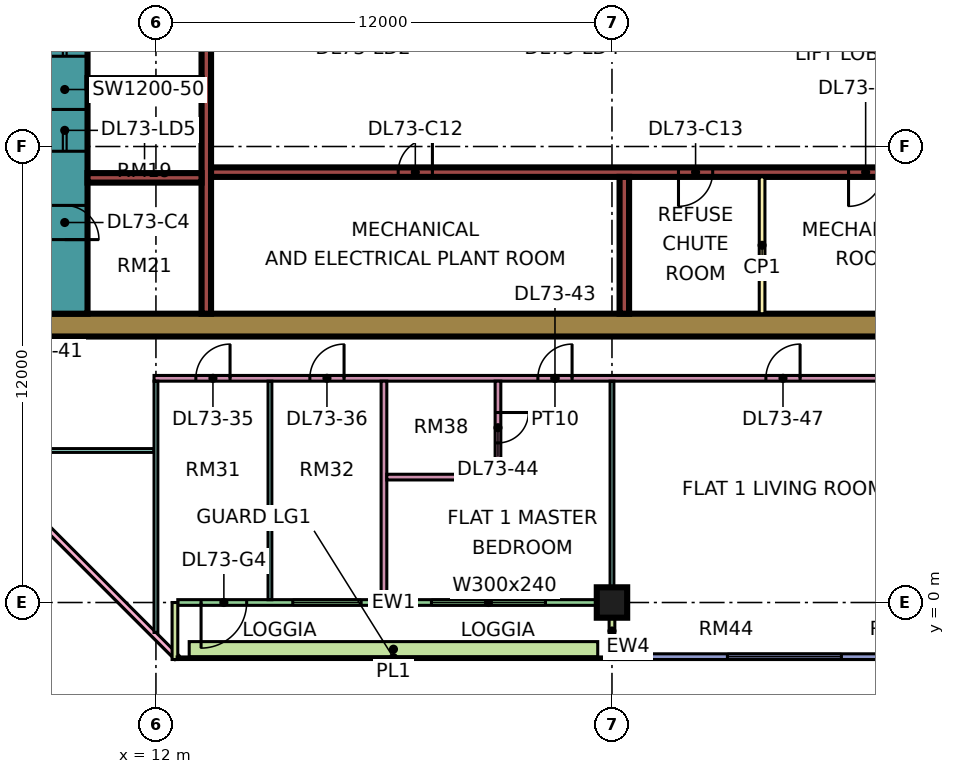
"""IFC4 building model, lengths in metres.
Left out: names, types, materials, properties, quantities, classifications, styles, units other than length and angle.
Written with IfcOpenShell. Run it as: python <this file> out.ifc"""

import sys

from ifc_helpers import new_model, si_unit, direction, frame, frame_2d, origin, origin_2d, place, context, subcontext, project, spatial, rectangle, extrude, element, fill, save


model = new_model("IFC4")
c1 = context("Model", 3, precision=1e-05, world=origin(), true_north=direction((0.0, 1.0)))
c2 = subcontext(c1, "Body", "Model", "MODEL_VIEW")
j1 = project(units=[si_unit("LENGTHUNIT", "METRE"), si_unit("PLANEANGLEUNIT", "RADIAN")], contexts=[c1])
p1 = place(None, origin())
s1 = spatial("IfcSite", under=j1, at=p1, CompositionType="ELEMENT")
p2 = place(p1, origin())
s2 = spatial("IfcBuilding", under=s1, at=p2, CompositionType="ELEMENT")
p3 = place(p2, frame((0.0, 0.0, 310.9)))
s3 = spatial("IfcBuildingStorey", under=s2, at=p3, CompositionType="ELEMENT", Elevation=310.9)
p4 = place(p3, frame((24.0, 0.0, 0.0), z_axis=(0.0, 0.0, 1.0), x_axis=(1.0, 0.0, 0.0)))
e1 = element("IfcColumn", 1, at=p4, inside=s3, PredefinedType="COLUMN", context=c2, shape_type="SweptSolid", body=[
    extrude(rectangle(XDim=0.8, YDim=0.8, at=origin_2d()), origin(), (0.0, 0.0, 1.0), 3.75),
])
p5 = place(p3, frame((9.0, 7.3, 0.0), z_axis=(0.0, 0.0, 1.0), x_axis=(1.0, 0.0, 0.0)))
e2 = element("IfcWall", 2, at=p5, inside=s3, PredefinedType="SHEAR", context=c2, shape_type="SweptSolid", body=[
    extrude(rectangle(XDim=25.0, YDim=0.6, at=frame_2d((12.5, 0.0))), origin(), (0.0, 0.0, 1.0), 3.75),
])
p6 = place(p3, frame((9.6, 7.6, 0.0), z_axis=(0.0, 0.0, 1.0), x_axis=(0.0, 1.0, 0.0)))
e3 = element("IfcWall", 3, at=p6, inside=s3, PredefinedType="SHEAR", context=c2, shape_type="SweptSolid", body=[
    extrude(rectangle(XDim=11.8, YDim=1.2, at=frame_2d((5.9, 0.0))), origin(), (0.0, 0.0, 1.0), 3.75),
])
p7 = place(p6, frame((4.275, 0.0, 0.0)))
e4 = element("IfcOpeningElement", 4, at=p7, cuts=e3, PredefinedType="OPENING", context=c2, shape_type="SweptSolid", body=[
    extrude(rectangle(XDim=1.1, YDim=2.2, at=frame_2d((0.55, 1.1))), frame((0.0, 0.61, 0.0), z_axis=(0.0, -1.0, 0.0), x_axis=(1.0, 0.0, 0.0)), (0.0, 0.0, 1.0), 1.22),
])
p8 = place(p6, frame((6.775, 0.0, 0.0)))
e5 = element("IfcOpeningElement", 5, at=p8, cuts=e3, PredefinedType="OPENING", context=c2, shape_type="SweptSolid", body=[
    extrude(rectangle(XDim=1.1, YDim=2.2, at=frame_2d((0.55, 1.1))), frame((0.0, 0.61, 0.0), z_axis=(0.0, -1.0, 0.0), x_axis=(1.0, 0.0, 0.0)), (0.0, 0.0, 1.0), 1.22),
])
p9 = place(p6, frame((9.7, 0.0, 0.0)))
e6 = element("IfcOpeningElement", 6, at=p9, cuts=e3, PredefinedType="OPENING", context=c2, shape_type="SweptSolid", body=[
    extrude(rectangle(XDim=1.1, YDim=2.2, at=frame_2d((0.55, 1.1))), frame((0.0, 0.61, 0.0), z_axis=(0.0, -1.0, 0.0), x_axis=(1.0, 0.0, 0.0)), (0.0, 0.0, 1.0), 1.22),
])
p10 = place(p6, frame((1.95, 0.0, 0.0)))
e7 = element("IfcOpeningElement", 7, at=p10, cuts=e3, PredefinedType="OPENING", context=c2, shape_type="SweptSolid", body=[
    extrude(rectangle(XDim=0.9, YDim=2.1, at=frame_2d((0.45, 1.05))), frame((0.0, 0.61, 0.0), z_axis=(0.0, -1.0, 0.0), x_axis=(1.0, 0.0, 0.0)), (0.0, 0.0, 1.0), 1.22),
])
p11 = place(p3, frame((13.325, 7.6, 0.0), z_axis=(0.0, 0.0, 1.0), x_axis=(0.0, 1.0, 0.0)))
e8 = element("IfcWall", 8, at=p11, inside=s3, PredefinedType="SHEAR", context=c2, shape_type="SweptSolid", body=[
    extrude(rectangle(XDim=11.8, YDim=0.25, at=frame_2d((5.9, 0.0))), origin(), (0.0, 0.0, 1.0), 3.75),
])
p12 = place(p3, frame((13.45, 11.325, 0.0), z_axis=(0.0, 0.0, 1.0), x_axis=(1.0, 0.0, 0.0)))
e9 = element("IfcWall", 9, at=p12, inside=s3, PredefinedType="SHEAR", context=c2, shape_type="SweptSolid", body=[
    extrude(rectangle(XDim=19.95, YDim=0.25, at=frame_2d((9.975, 0.0))), origin(), (0.0, 0.0, 1.0), 3.75),
])
p13 = place(p12, frame((4.925, 0.0, 0.0)))
e10 = element("IfcOpeningElement", 10, at=p13, cuts=e9, PredefinedType="OPENING", context=c2, shape_type="SweptSolid", body=[
    extrude(rectangle(XDim=0.9, YDim=2.1, at=frame_2d((0.45, 1.05))), frame((0.0, 0.135, 0.0), z_axis=(0.0, -1.0, 0.0), x_axis=(1.0, 0.0, 0.0)), (0.0, 0.0, 1.0), 0.27),
])
p14 = place(p12, frame((12.3, 0.0, 0.0)))
e11 = element("IfcOpeningElement", 11, at=p14, cuts=e9, PredefinedType="OPENING", context=c2, shape_type="SweptSolid", body=[
    extrude(rectangle(XDim=0.9, YDim=2.1, at=frame_2d((0.45, 1.05))), frame((0.0, 0.135, 0.0), z_axis=(0.0, -1.0, 0.0), x_axis=(1.0, 0.0, 0.0)), (0.0, 0.0, 1.0), 0.27),
])
p15 = place(p12, frame((16.775, 0.0, 0.0)))
e12 = element("IfcOpeningElement", 12, at=p15, cuts=e9, PredefinedType="OPENING", context=c2, shape_type="SweptSolid", body=[
    extrude(rectangle(XDim=0.9, YDim=2.1, at=frame_2d((0.45, 1.05))), frame((0.0, 0.135, 0.0), z_axis=(0.0, -1.0, 0.0), x_axis=(1.0, 0.0, 0.0)), (0.0, 0.0, 1.0), 0.27),
])
for number, where, z_axis, x_axis in (
    (13, (10.2, 11.175, 0.0), (0.0, 0.0, 1.0), (1.0, 0.0, 0.0)),
    (14, (10.2, 13.675, 0.0), (0.0, 0.0, 1.0), (1.0, 0.0, 0.0)),
):
    element("IfcWall", number, at=place(p3, frame(where, z_axis=z_axis, x_axis=x_axis)), inside=s3, PredefinedType="SHEAR", context=c2, shape_type="SweptSolid", body=[
        extrude(rectangle(XDim=3.0, YDim=0.25, at=frame_2d((1.5, 0.0))), origin(), (0.0, 0.0, 1.0), 3.75),
    ])
p16 = place(p3, frame((24.325, 7.6, 0.0), z_axis=(0.0, 0.0, 1.0), x_axis=(0.0, 1.0, 0.0)))
e15 = element("IfcWall", 15, at=p16, inside=s3, PredefinedType="SHEAR", context=c2, shape_type="SweptSolid", body=[
    extrude(rectangle(XDim=3.6, YDim=0.25, at=frame_2d((1.8, 0.0))), origin(), (0.0, 0.0, 1.0), 3.75),
])
p17 = place(p3, frame((-1.447, 12.553, 0.0), z_axis=(0.0, 0.0, 1.0), x_axis=(0.707106781187, -0.707106781187, 0.0)))
e16 = element("IfcWall", 16, at=p17, inside=s3, PredefinedType="SOLIDWALL", context=c2, shape_type="SweptSolid", body=[
    extrude(rectangle(XDim=19.799, YDim=0.15, at=frame_2d((9.899, 0.0))), origin(), (0.0, 0.0, 1.0), 3.35),
])
p18 = place(p17, frame((2.212, 0.0, 0.45)))
e17 = element("IfcOpeningElement", 17, at=p18, cuts=e16, PredefinedType="OPENING", context=c2, shape_type="SweptSolid", body=[
    extrude(rectangle(XDim=3.0, YDim=2.4, at=frame_2d((1.5, 1.2))), frame((0.0, 0.085, 0.0), z_axis=(0.0, -1.0, 0.0), x_axis=(1.0, 0.0, 0.0)), (0.0, 0.0, 1.0), 0.17),
])
p19 = place(p17, frame((10.216, 0.0, 0.45)))
e18 = element("IfcOpeningElement", 18, at=p19, cuts=e16, PredefinedType="OPENING", context=c2, shape_type="SweptSolid", body=[
    extrude(rectangle(XDim=3.0, YDim=2.4, at=frame_2d((1.5, 1.2))), frame((0.0, 0.085, 0.0), z_axis=(0.0, -1.0, 0.0), x_axis=(1.0, 0.0, 0.0)), (0.0, 0.0, 1.0), 0.17),
])
p20 = place(p3, frame((12.575, 0.0, 0.0), z_axis=(0.0, 0.0, 1.0), x_axis=(1.0, 0.0, 0.0)))
e19 = element("IfcWall", 19, at=p20, inside=s3, PredefinedType="SOLIDWALL", context=c2, shape_type="SweptSolid", body=[
    extrude(rectangle(XDim=11.35, YDim=0.15, at=frame_2d((5.675, 0.0))), origin(), (0.0, 0.0, 1.0), 3.35),
])
p21 = place(p20, frame((0.613, 0.0, 0.0)))
e20 = element("IfcOpeningElement", 20, at=p21, cuts=e19, PredefinedType="OPENING", context=c2, shape_type="SweptSolid", body=[
    extrude(rectangle(XDim=1.2, YDim=2.4, at=frame_2d((0.6, 1.2))), frame((0.0, 0.085, 0.0), z_axis=(0.0, -1.0, 0.0), x_axis=(1.0, 0.0, 0.0)), (0.0, 0.0, 1.0), 0.17),
])
p22 = place(p20, frame((3.025, 0.0, 0.45)))
e21 = element("IfcOpeningElement", 21, at=p22, cuts=e19, PredefinedType="OPENING", context=c2, shape_type="SweptSolid", body=[
    extrude(rectangle(XDim=1.8, YDim=2.4, at=frame_2d((0.9, 1.2))), frame((0.0, 0.085, 0.0), z_axis=(0.0, -1.0, 0.0), x_axis=(1.0, 0.0, 0.0)), (0.0, 0.0, 1.0), 0.17),
])
p23 = place(p20, frame((6.675, 0.0, 0.45)))
e22 = element("IfcOpeningElement", 22, at=p23, cuts=e19, PredefinedType="OPENING", context=c2, shape_type="SweptSolid", body=[
    extrude(rectangle(XDim=3.0, YDim=2.4, at=frame_2d((1.5, 1.2))), frame((0.0, 0.085, 0.0), z_axis=(0.0, -1.0, 0.0), x_axis=(1.0, 0.0, 0.0)), (0.0, 0.0, 1.0), 0.17),
])
for number, where, z_axis, x_axis in (
    (23, (12.5, -1.5, 0.0), (0.0, 0.0, 1.0), (0.0, 1.0, 0.0)),
    (24, (24.0, -1.5, 0.0), (0.0, 0.0, 1.0), (0.0, 1.0, 0.0)),
):
    element("IfcWall", number, at=place(p3, frame(where, z_axis=z_axis, x_axis=x_axis)), inside=s3, PredefinedType="SOLIDWALL", context=c2, shape_type="SweptSolid", body=[
        extrude(rectangle(XDim=1.5, YDim=0.15, at=frame_2d((0.75, 0.0))), origin(), (0.0, 0.0, 1.0), 3.35),
    ])
p24 = place(p3, frame((24.075, -1.425, 0.0), z_axis=(0.0, 0.0, 1.0), x_axis=(1.0, 0.0, 0.0)))
e25 = element("IfcWall", 25, at=p24, inside=s3, PredefinedType="SOLIDWALL", context=c2, shape_type="SweptSolid", body=[
    extrude(rectangle(XDim=11.85, YDim=0.15, at=frame_2d((5.925, 0.0))), origin(), (0.0, 0.0, 1.0), 3.35),
])
p25 = place(p24, frame((2.962, 0.0, 0.45)))
e26 = element("IfcOpeningElement", 26, at=p25, cuts=e25, PredefinedType="OPENING", context=c2, shape_type="SweptSolid", body=[
    extrude(rectangle(XDim=3.0, YDim=2.4, at=frame_2d((1.5, 1.2))), frame((0.0, 0.085, 0.0), z_axis=(0.0, -1.0, 0.0), x_axis=(1.0, 0.0, 0.0)), (0.0, 0.0, 1.0), 0.17),
])
p26 = place(p24, frame((9.488, 0.0, 0.45)))
e27 = element("IfcOpeningElement", 27, at=p26, cuts=e25, PredefinedType="OPENING", context=c2, shape_type="SweptSolid", body=[
    extrude(rectangle(XDim=1.8, YDim=2.4, at=frame_2d((0.9, 1.2))), frame((0.0, 0.085, 0.0), z_axis=(0.0, -1.0, 0.0), x_axis=(1.0, 0.0, 0.0)), (0.0, 0.0, 1.0), 0.17),
])
p27 = place(p3, frame((12.875, -1.229, 0.0), z_axis=(0.0, 0.0, 1.0), x_axis=(1.0, 0.0, 0.0)))
e28 = element("IfcWall", 28, at=p27, inside=s3, PredefinedType="SOLIDWALL", context=c2, shape_type="SweptSolid", body=[
    extrude(rectangle(XDim=10.75, YDim=0.4, at=frame_2d((5.375, 0.0))), origin(), (0.0, 0.0, 1.0), 0.7),
])
p28 = place(p3, frame((27.95, 7.6, 0.0), z_axis=(0.0, 0.0, 1.0), x_axis=(0.0, 1.0, 0.0)))
e29 = element("IfcWall", 29, at=p28, inside=s3, PredefinedType="PARTITIONING", context=c2, shape_type="SweptSolid", body=[
    extrude(rectangle(XDim=3.6, YDim=0.15, at=frame_2d((1.8, 0.0))), origin(), (0.0, 0.0, 1.0), 3.35),
])
p29 = place(p3, frame((9.05, 4.0, 0.0), z_axis=(0.0, 0.0, 1.0), x_axis=(1.0, 0.0, 0.0)))
e30 = element("IfcWall", 30, at=p29, inside=s3, PredefinedType="PARTITIONING", context=c2, shape_type="SweptSolid", body=[
    extrude(rectangle(XDim=2.9, YDim=0.1, at=frame_2d((1.45, 0.0))), origin(), (0.0, 0.0, 1.0), 3.35),
])
p30 = place(p3, frame((11.95, 5.9, 0.0), z_axis=(0.0, 0.0, 1.0), x_axis=(1.0, 0.0, 0.0)))
e31 = element("IfcWall", 31, at=p30, inside=s3, PredefinedType="PARTITIONING", context=c2, shape_type="SweptSolid", body=[
    extrude(rectangle(XDim=21.1, YDim=0.15, at=frame_2d((10.55, 0.0))), origin(), (0.0, 0.0, 1.0), 3.35),
])
p31 = place(p30, frame((1.1, 0.0, 0.0)))
e32 = element("IfcOpeningElement", 32, at=p31, cuts=e31, PredefinedType="OPENING", context=c2, shape_type="SweptSolid", body=[
    extrude(rectangle(XDim=0.9, YDim=2.1, at=frame_2d((0.45, 1.05))), frame((0.0, 0.085, 0.0), z_axis=(0.0, -1.0, 0.0), x_axis=(1.0, 0.0, 0.0)), (0.0, 0.0, 1.0), 0.17),
])
p32 = place(p30, frame((4.1, 0.0, 0.0)))
e33 = element("IfcOpeningElement", 33, at=p32, cuts=e31, PredefinedType="OPENING", context=c2, shape_type="SweptSolid", body=[
    extrude(rectangle(XDim=0.9, YDim=2.1, at=frame_2d((0.45, 1.05))), frame((0.0, 0.085, 0.0), z_axis=(0.0, -1.0, 0.0), x_axis=(1.0, 0.0, 0.0)), (0.0, 0.0, 1.0), 0.17),
])
p33 = place(p30, frame((10.1, 0.0, 0.0)))
e34 = element("IfcOpeningElement", 34, at=p33, cuts=e31, PredefinedType="OPENING", context=c2, shape_type="SweptSolid", body=[
    extrude(rectangle(XDim=0.9, YDim=2.1, at=frame_2d((0.45, 1.05))), frame((0.0, 0.085, 0.0), z_axis=(0.0, -1.0, 0.0), x_axis=(1.0, 0.0, 0.0)), (0.0, 0.0, 1.0), 0.17),
])
p34 = place(p30, frame((16.1, 0.0, 0.0)))
e35 = element("IfcOpeningElement", 35, at=p34, cuts=e31, PredefinedType="OPENING", context=c2, shape_type="SweptSolid", body=[
    extrude(rectangle(XDim=0.9, YDim=2.1, at=frame_2d((0.45, 1.05))), frame((0.0, 0.085, 0.0), z_axis=(0.0, -1.0, 0.0), x_axis=(1.0, 0.0, 0.0)), (0.0, 0.0, 1.0), 0.17),
])
p35 = place(p3, frame((12.0, -0.788, 0.0), z_axis=(0.0, 0.0, 1.0), x_axis=(0.0, 1.0, 0.0)))
e36 = element("IfcWall", 36, at=p35, inside=s3, PredefinedType="PARTITIONING", context=c2, shape_type="SweptSolid", body=[
    extrude(rectangle(XDim=6.613, YDim=0.1, at=frame_2d((3.306, 0.0))), origin(), (0.0, 0.0, 1.0), 3.35),
])
p36 = place(p3, frame((15.0, 0.074, 0.0), z_axis=(0.0, 0.0, 1.0), x_axis=(0.0, 1.0, 0.0)))
e37 = element("IfcWall", 37, at=p36, inside=s3, PredefinedType="PARTITIONING", context=c2, shape_type="SweptSolid", body=[
    extrude(rectangle(XDim=5.751, YDim=0.1, at=frame_2d((2.875, 0.0))), origin(), (0.0, 0.0, 1.0), 3.35),
])
p37 = place(p3, frame((18.0, 0.074, 0.0), z_axis=(0.0, 0.0, 1.0), x_axis=(0.0, 1.0, 0.0)))
e38 = element("IfcWall", 38, at=p37, inside=s3, PredefinedType="PARTITIONING", context=c2, shape_type="SweptSolid", body=[
    extrude(rectangle(XDim=5.751, YDim=0.15, at=frame_2d((2.875, 0.0))), origin(), (0.0, 0.0, 1.0), 3.35),
])
p38 = place(p3, frame((18.075, 3.3, 0.0), z_axis=(0.0, 0.0, 1.0), x_axis=(1.0, 0.0, 0.0)))
e39 = element("IfcWall", 39, at=p38, inside=s3, PredefinedType="PARTITIONING", context=c2, shape_type="SweptSolid", body=[
    extrude(rectangle(XDim=3.0, YDim=0.15, at=frame_2d((1.5, 0.0))), origin(), (0.0, 0.0, 1.0), 3.35),
])
p39 = place(p3, frame((21.0, 3.375, 0.0), z_axis=(0.0, 0.0, 1.0), x_axis=(0.0, 1.0, 0.0)))
e40 = element("IfcWall", 40, at=p39, inside=s3, PredefinedType="PARTITIONING", context=c2, shape_type="SweptSolid", body=[
    extrude(rectangle(XDim=2.45, YDim=0.15, at=frame_2d((1.225, 0.0))), origin(), (0.0, 0.0, 1.0), 3.35),
])
p40 = place(p39, frame((0.825, 0.0, 0.0)))
e41 = element("IfcOpeningElement", 41, at=p40, cuts=e40, PredefinedType="OPENING", context=c2, shape_type="SweptSolid", body=[
    extrude(rectangle(XDim=0.8, YDim=2.1, at=frame_2d((0.4, 1.05))), frame((0.0, 0.085, 0.0), z_axis=(0.0, -1.0, 0.0), x_axis=(1.0, 0.0, 0.0)), (0.0, 0.0, 1.0), 0.17),
])
p41 = place(p3, frame((24.0, 0.0, 0.0), z_axis=(0.0, 0.0, 1.0), x_axis=(0.0, 1.0, 0.0)))
e42 = element("IfcWall", 42, at=p41, inside=s3, PredefinedType="PARTITIONING", context=c2, shape_type="SweptSolid", body=[
    extrude(rectangle(XDim=5.825, YDim=0.1, at=frame_2d((2.913, 0.0))), origin(), (0.0, 0.0, 1.0), 3.35),
])
p42 = place(p21, frame((1.2, 0.0, 0.0), z_axis=(0.0, 0.0, 1.0), x_axis=(-1.0, 0.0, 0.0)))
e43 = element("IfcDoor", 43, at=p42, inside=s3, OperationType="DOUBLE_DOOR_SINGLE_SWING", PredefinedType="DOOR", context=c2, shape_type="SweptSolid", body=[
    extrude(rectangle(XDim=1.2, YDim=2.4, at=frame_2d((0.6, 1.2))), frame((0.0, 0.025, 0.0), z_axis=(0.0, -1.0, 0.0), x_axis=(1.0, 0.0, 0.0)), (0.0, 0.0, 1.0), 0.05),
])
fill(e20, e43)
p43 = place(p22, origin())
e44 = element("IfcWindow", 44, at=p43, inside=s3, PartitioningType="SINGLE_PANEL", PredefinedType="WINDOW", context=c2, shape_type="SweptSolid", body=[
    extrude(rectangle(XDim=1.8, YDim=2.4, at=frame_2d((0.9, 1.2))), frame((0.0, 0.03, 0.0), z_axis=(0.0, -1.0, 0.0), x_axis=(1.0, 0.0, 0.0)), (0.0, 0.0, 1.0), 0.06),
])
fill(e21, e44)
p44 = place(p23, origin())
e45 = element("IfcWindow", 45, at=p44, inside=s3, PartitioningType="SINGLE_PANEL", PredefinedType="WINDOW", context=c2, shape_type="SweptSolid", body=[
    extrude(rectangle(XDim=3.0, YDim=2.4, at=frame_2d((1.5, 1.2))), frame((0.0, 0.03, 0.0), z_axis=(0.0, -1.0, 0.0), x_axis=(1.0, 0.0, 0.0)), (0.0, 0.0, 1.0), 0.06),
])
fill(e22, e45)
p45 = place(p25, origin())
e46 = element("IfcWindow", 46, at=p45, inside=s3, PartitioningType="SINGLE_PANEL", PredefinedType="WINDOW", context=c2, shape_type="SweptSolid", body=[
    extrude(rectangle(XDim=3.0, YDim=2.4, at=frame_2d((1.5, 1.2))), frame((0.0, 0.03, 0.0), z_axis=(0.0, -1.0, 0.0), x_axis=(1.0, 0.0, 0.0)), (0.0, 0.0, 1.0), 0.06),
])
fill(e26, e46)
p46 = place(p7, origin())
e47 = element("IfcDoor", 47, at=p46, inside=s3, OperationType="DOUBLE_DOOR_SLIDING", PredefinedType="DOOR", context=c2, shape_type="SweptSolid", body=[
    extrude(rectangle(XDim=1.1, YDim=2.2, at=frame_2d((0.55, 1.1))), frame((0.0, 0.025, 0.0), z_axis=(0.0, -1.0, 0.0), x_axis=(1.0, 0.0, 0.0)), (0.0, 0.0, 1.0), 0.05),
])
fill(e4, e47)
p47 = place(p8, origin())
e48 = element("IfcDoor", 48, at=p47, inside=s3, OperationType="DOUBLE_DOOR_SLIDING", PredefinedType="DOOR", context=c2, shape_type="SweptSolid", body=[
    extrude(rectangle(XDim=1.1, YDim=2.2, at=frame_2d((0.55, 1.1))), frame((0.0, 0.025, 0.0), z_axis=(0.0, -1.0, 0.0), x_axis=(1.0, 0.0, 0.0)), (0.0, 0.0, 1.0), 0.05),
])
fill(e5, e48)
p48 = place(p10, frame((0.9, 0.0, 0.0), z_axis=(0.0, 0.0, 1.0), x_axis=(-1.0, 0.0, 0.0)))
e49 = element("IfcDoor", 49, at=p48, inside=s3, OperationType="SINGLE_SWING_LEFT", PredefinedType="DOOR", context=c2, shape_type="SweptSolid", body=[
    extrude(rectangle(XDim=0.9, YDim=2.1, at=frame_2d((0.45, 1.05))), frame((0.0, 0.025, 0.0), z_axis=(0.0, -1.0, 0.0), x_axis=(1.0, 0.0, 0.0)), (0.0, 0.0, 1.0), 0.05),
])
fill(e7, e49)
p49 = place(p13, frame((0.9, 0.0, 0.0), z_axis=(0.0, 0.0, 1.0), x_axis=(-1.0, 0.0, 0.0)))
e50 = element("IfcDoor", 50, at=p49, inside=s3, OperationType="SINGLE_SWING_RIGHT", PredefinedType="DOOR", context=c2, shape_type="SweptSolid", body=[
    extrude(rectangle(XDim=0.9, YDim=2.1, at=frame_2d((0.45, 1.05))), frame((0.0, 0.025, 0.0), z_axis=(0.0, -1.0, 0.0), x_axis=(1.0, 0.0, 0.0)), (0.0, 0.0, 1.0), 0.05),
])
fill(e10, e50)
p50 = place(p14, frame((0.9, 0.0, 0.0), z_axis=(0.0, 0.0, 1.0), x_axis=(-1.0, 0.0, 0.0)))
e51 = element("IfcDoor", 51, at=p50, inside=s3, OperationType="SINGLE_SWING_LEFT", PredefinedType="DOOR", context=c2, shape_type="SweptSolid", body=[
    extrude(rectangle(XDim=0.9, YDim=2.1, at=frame_2d((0.45, 1.05))), frame((0.0, 0.025, 0.0), z_axis=(0.0, -1.0, 0.0), x_axis=(1.0, 0.0, 0.0)), (0.0, 0.0, 1.0), 0.05),
])
fill(e11, e51)
p51 = place(p15, frame((0.9, 0.0, 0.0), z_axis=(0.0, 0.0, 1.0), x_axis=(-1.0, 0.0, 0.0)))
e52 = element("IfcDoor", 52, at=p51, inside=s3, OperationType="SINGLE_SWING_LEFT", PredefinedType="DOOR", context=c2, shape_type="SweptSolid", body=[
    extrude(rectangle(XDim=0.9, YDim=2.1, at=frame_2d((0.45, 1.05))), frame((0.0, 0.025, 0.0), z_axis=(0.0, -1.0, 0.0), x_axis=(1.0, 0.0, 0.0)), (0.0, 0.0, 1.0), 0.05),
])
fill(e12, e52)
p52 = place(p31, frame((0.9, 0.0, 0.0), z_axis=(0.0, 0.0, 1.0), x_axis=(-1.0, 0.0, 0.0)))
e53 = element("IfcDoor", 53, at=p52, inside=s3, OperationType="SINGLE_SWING_RIGHT", PredefinedType="DOOR", context=c2, shape_type="SweptSolid", body=[
    extrude(rectangle(XDim=0.9, YDim=2.1, at=frame_2d((0.45, 1.05))), frame((0.0, 0.025, 0.0), z_axis=(0.0, -1.0, 0.0), x_axis=(1.0, 0.0, 0.0)), (0.0, 0.0, 1.0), 0.05),
])
fill(e32, e53)
p53 = place(p32, frame((0.9, 0.0, 0.0), z_axis=(0.0, 0.0, 1.0), x_axis=(-1.0, 0.0, 0.0)))
e54 = element("IfcDoor", 54, at=p53, inside=s3, OperationType="SINGLE_SWING_RIGHT", PredefinedType="DOOR", context=c2, shape_type="SweptSolid", body=[
    extrude(rectangle(XDim=0.9, YDim=2.1, at=frame_2d((0.45, 1.05))), frame((0.0, 0.025, 0.0), z_axis=(0.0, -1.0, 0.0), x_axis=(1.0, 0.0, 0.0)), (0.0, 0.0, 1.0), 0.05),
])
fill(e33, e54)
p54 = place(p33, frame((0.9, 0.0, 0.0), z_axis=(0.0, 0.0, 1.0), x_axis=(-1.0, 0.0, 0.0)))
e55 = element("IfcDoor", 55, at=p54, inside=s3, OperationType="SINGLE_SWING_RIGHT", PredefinedType="DOOR", context=c2, shape_type="SweptSolid", body=[
    extrude(rectangle(XDim=0.9, YDim=2.1, at=frame_2d((0.45, 1.05))), frame((0.0, 0.025, 0.0), z_axis=(0.0, -1.0, 0.0), x_axis=(1.0, 0.0, 0.0)), (0.0, 0.0, 1.0), 0.05),
])
fill(e34, e55)
p55 = place(p40, origin())
e56 = element("IfcDoor", 56, at=p55, inside=s3, OperationType="SINGLE_SWING_RIGHT", PredefinedType="DOOR", context=c2, shape_type="SweptSolid", body=[
    extrude(rectangle(XDim=0.8, YDim=2.1, at=frame_2d((0.4, 1.05))), frame((0.0, 0.025, 0.0), z_axis=(0.0, -1.0, 0.0), x_axis=(1.0, 0.0, 0.0)), (0.0, 0.0, 1.0), 0.05),
])
fill(e41, e56)
p56 = place(p34, frame((0.9, 0.0, 0.0), z_axis=(0.0, 0.0, 1.0), x_axis=(-1.0, 0.0, 0.0)))
e57 = element("IfcDoor", 57, at=p56, inside=s3, OperationType="SINGLE_SWING_RIGHT", PredefinedType="DOOR", context=c2, shape_type="SweptSolid", body=[
    extrude(rectangle(XDim=0.9, YDim=2.1, at=frame_2d((0.45, 1.05))), frame((0.0, 0.025, 0.0), z_axis=(0.0, -1.0, 0.0), x_axis=(1.0, 0.0, 0.0)), (0.0, 0.0, 1.0), 0.05),
])
fill(e35, e57)
save(model, sys.argv[1])
